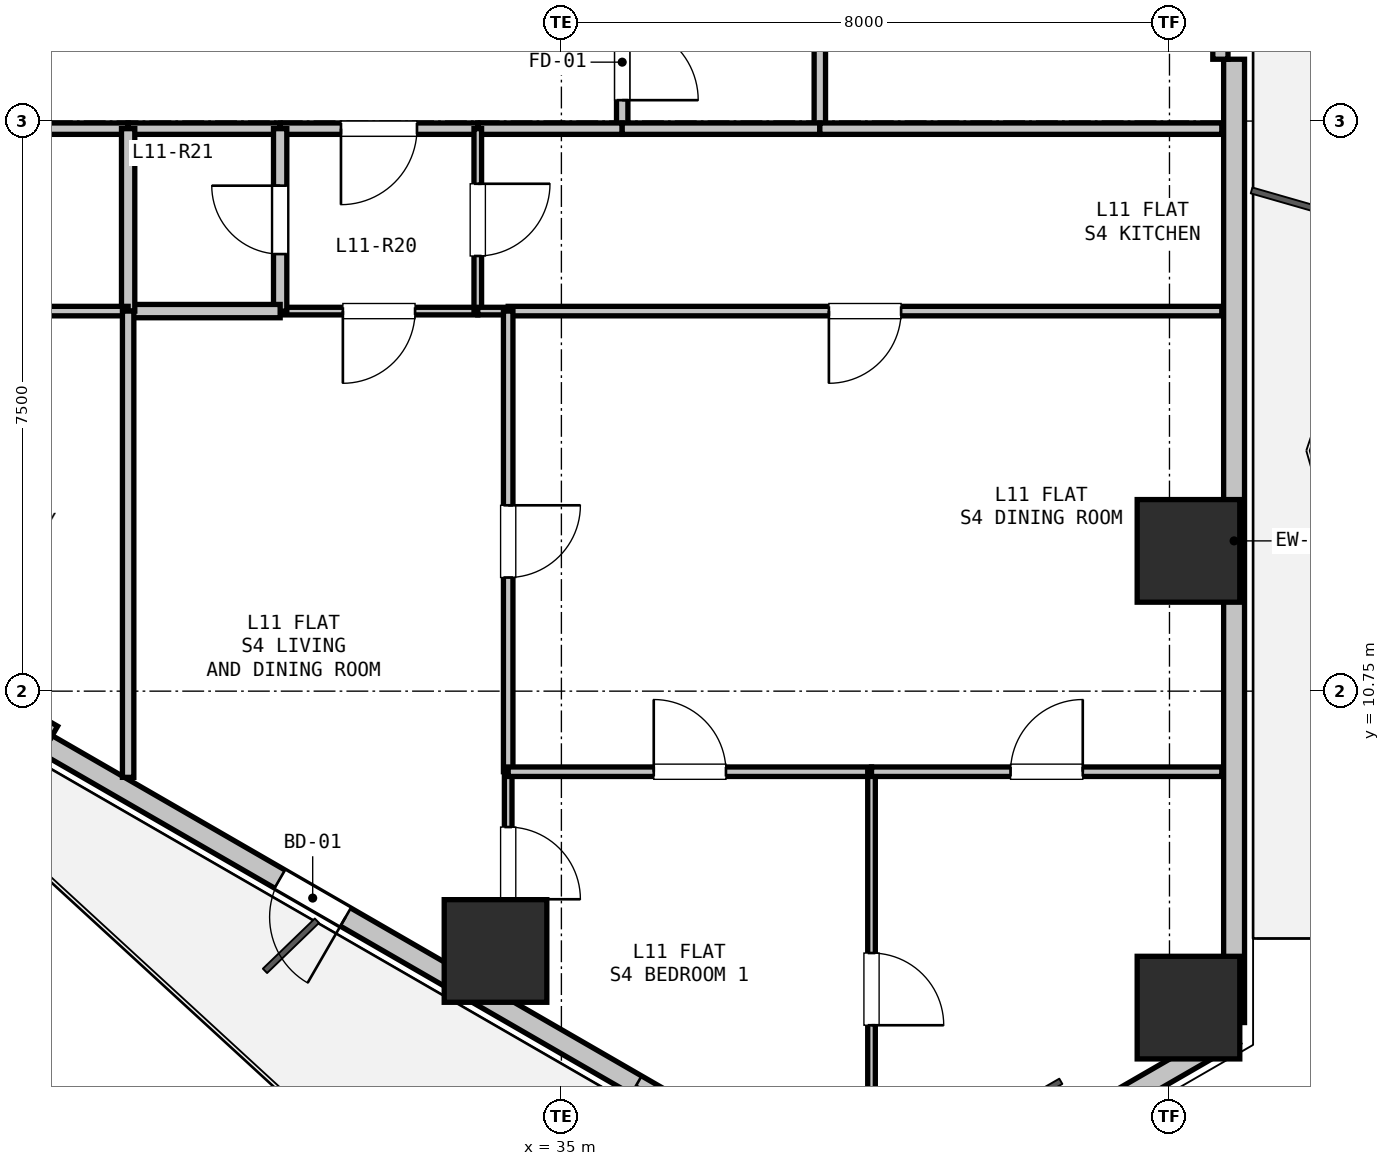
"""IFC4 building model, lengths in metres.
Left out: names, types, materials, properties, quantities, classifications, styles, units other than length and angle.
Written with IfcOpenShell. Run it as: python <this file> out.ifc"""

import sys

from ifc_helpers import new_model, si_unit, direction, frame, frame_2d, origin, origin_2d, place, context, subcontext, project, spatial, rectangle, hollow_rectangle, extrude, element, fill, save


model = new_model("IFC4")
c1 = context("Model", 3, precision=1e-05, world=origin(), true_north=direction((0.0, 1.0)))
c2 = subcontext(c1, "Body", "Model", "MODEL_VIEW")
j1 = project(units=[si_unit("LENGTHUNIT", "METRE"), si_unit("PLANEANGLEUNIT", "RADIAN")], contexts=[c1])
p1 = place(None, origin())
s1 = spatial("IfcSite", under=j1, at=p1, CompositionType="ELEMENT")
p2 = place(p1, origin())
s2 = spatial("IfcBuilding", under=s1, at=p2, CompositionType="ELEMENT")
p3 = place(p2, frame((0.0, 0.0, 42.3)))
s3 = spatial("IfcBuildingStorey", under=s2, at=p3, CompositionType="ELEMENT", Elevation=42.3)
for number, where, z_axis, x_axis in (
    (1, (43.25, 12.595, 0.0), (0.0, 0.0, 1.0), (1.0, 0.0, 0.0)),
    (2, (43.25, 6.587, 0.0), (0.0, 0.0, 1.0), (1.0, 0.0, 0.0)),
    (3, (34.133, 7.332, 0.0), (0.0, 0.0, 1.0), (1.0, 0.0, 0.0)),
):
    element("IfcColumn", number, at=place(p3, frame(where, z_axis=z_axis, x_axis=x_axis)), inside=s3, PredefinedType="COLUMN", context=c2, shape_type="SweptSolid", body=[
        extrude(hollow_rectangle(XDim=1.35, YDim=1.35, WallThickness=0.036, at=origin_2d()), origin(), (0.0, 0.0, 1.0), 3.3),
    ])
p4 = place(p3, frame((43.85, 6.24, 0.0), z_axis=(0.0, 0.0, 1.0), x_axis=(-0.866043601342, -0.499968479581, 0.0)))
e4 = element("IfcWall", 4, at=p4, inside=s3, PredefinedType="SOLIDWALL", context=c2, shape_type="SweptSolid", body=[
    extrude(rectangle(XDim=5.211, YDim=0.275, at=frame_2d((2.605, 0.0))), origin(), (0.0, 0.0, 1.0), 2.66),
])
p5 = place(p3, frame((43.85, 19.063, 0.0), z_axis=(0.0, 0.0, 1.0), x_axis=(0.0, -1.0, 0.0)))
e5 = element("IfcWall", 5, at=p5, inside=s3, PredefinedType="SOLIDWALL", context=c2, shape_type="SweptSolid", body=[
    extrude(rectangle(XDim=12.673, YDim=0.275, at=frame_2d((6.336, 0.0))), origin(), (0.0, 0.0, 1.0), 2.66),
])
p6 = place(p3, frame((43.67, 20.763, 0.0), z_axis=(0.0, 0.0, 1.0), x_axis=(0.0, -1.0, 0.0)))
e6 = element("IfcWall", 6, at=p6, inside=s3, PredefinedType="PARAPET", context=c2, shape_type="SweptSolid", body=[
    extrude(rectangle(XDim=1.7, YDim=0.2, at=frame_2d((0.85, 0.0))), origin(), (0.0, 0.0, 1.0), 2.66),
])
p7 = place(p3, frame((39.207, 3.71, 0.0), z_axis=(0.0, 0.0, 1.0), x_axis=(-0.86603192154, 0.499988710747, 0.0)))
e7 = element("IfcWall", 7, at=p7, inside=s3, PredefinedType="SOLIDWALL", context=c2, shape_type="SweptSolid", body=[
    extrude(rectangle(XDim=12.673, YDim=0.275, at=frame_2d((6.336, 0.0))), origin(), (0.0, 0.0, 1.0), 2.66),
])
p8 = place(p7, frame((8.136, 0.0, 0.0)))
e8 = element("IfcOpeningElement", 8, at=p8, cuts=e7, PredefinedType="OPENING", context=c2, shape_type="SweptSolid", body=[
    extrude(rectangle(XDim=1.0, YDim=2.1, at=frame_2d((0.5, 1.05))), frame((0.0, 0.147, 0.0), z_axis=(0.0, -1.0, 0.0), x_axis=(1.0, 0.0, 0.0)), (0.0, 0.0, 1.0), 0.295),
])
p9 = place(p7, frame((2.518, 0.0, 0.9)))
e9 = element("IfcOpeningElement", 9, at=p9, cuts=e7, PredefinedType="OPENING", context=c2, shape_type="SweptSolid", body=[
    extrude(rectangle(XDim=1.2, YDim=1.4, at=frame_2d((0.6, 0.7))), frame((0.0, 0.147, 0.0), z_axis=(0.0, -1.0, 0.0), x_axis=(1.0, 0.0, 0.0)), (0.0, 0.0, 1.0), 0.295),
])
p10 = place(p3, frame((28.322, 10.202, 0.0), z_axis=(0.0, 0.0, 1.0), x_axis=(-0.86605165483, 0.499954529098, 0.0)))
e10 = element("IfcWall", 10, at=p10, inside=s3, PredefinedType="PARAPET", context=c2, shape_type="SweptSolid", body=[
    extrude(rectangle(XDim=1.7, YDim=0.2, at=frame_2d((0.85, 0.0))), origin(), (0.0, 0.0, 1.0), 2.66),
])
p11 = place(p3, frame((35.8, 19.9, 0.0), z_axis=(0.0, 0.0, 1.0), x_axis=(0.0, -1.0, 0.0)))
e11 = element("IfcWall", 11, at=p11, inside=s3, PredefinedType="PARTITIONING", context=c2, shape_type="SweptSolid", body=[
    extrude(rectangle(XDim=1.75, YDim=0.15, at=frame_2d((0.875, 0.0))), origin(), (0.0, 0.0, 1.0), 3.04),
])
p12 = place(p11, frame((0.375, 0.0, 0.0)))
e12 = element("IfcOpeningElement", 12, at=p12, cuts=e11, PredefinedType="OPENING", context=c2, shape_type="SweptSolid", body=[
    extrude(rectangle(XDim=1.0, YDim=2.15, at=frame_2d((0.5, 1.075))), frame((0.0, 0.085, 0.0), z_axis=(0.0, -1.0, 0.0), x_axis=(1.0, 0.0, 0.0)), (0.0, 0.0, 1.0), 0.17),
])
p13 = place(p3, frame((35.8, 18.15, 0.0), z_axis=(0.0, 0.0, 1.0), x_axis=(-1.0, 0.0, 0.0)))
e13 = element("IfcWall", 13, at=p13, inside=s3, PredefinedType="PARTITIONING", context=c2, shape_type="SweptSolid", body=[
    extrude(rectangle(XDim=1.9, YDim=0.15, at=frame_2d((0.95, 0.0))), origin(), (0.0, 0.0, 1.0), 3.04),
])
p14 = place(p3, frame((33.9, 18.15, 0.0), z_axis=(0.0, 0.0, 1.0), x_axis=(-1.0, 0.0, 0.0)))
e14 = element("IfcWall", 14, at=p14, inside=s3, PredefinedType="PARTITIONING", context=c2, shape_type="SweptSolid", body=[
    extrude(rectangle(XDim=2.6, YDim=0.15, at=frame_2d((1.3, 0.0))), origin(), (0.0, 0.0, 1.0), 3.04),
])
p15 = place(p14, frame((0.8, 0.0, 0.0)))
e15 = element("IfcOpeningElement", 15, at=p15, cuts=e14, PredefinedType="OPENING", context=c2, shape_type="SweptSolid", body=[
    extrude(rectangle(XDim=1.0, YDim=2.15, at=frame_2d((0.5, 1.075))), frame((0.0, 0.085, 0.0), z_axis=(0.0, -1.0, 0.0), x_axis=(1.0, 0.0, 0.0)), (0.0, 0.0, 1.0), 0.17),
])
p16 = place(p3, frame((31.3, 18.15, 0.0), z_axis=(0.0, 0.0, 1.0), x_axis=(-1.0, 0.0, 0.0)))
e16 = element("IfcWall", 16, at=p16, inside=s3, PredefinedType="PARTITIONING", context=c2, shape_type="SweptSolid", body=[
    extrude(rectangle(XDim=2.0, YDim=0.15, at=frame_2d((1.0, 0.0))), origin(), (0.0, 0.0, 1.0), 3.04),
])
p17 = place(p3, frame((29.3, 18.15, 0.0), z_axis=(0.0, 0.0, 1.0), x_axis=(-1.0, 0.0, 0.0)))
e17 = element("IfcWall", 17, at=p17, inside=s3, PredefinedType="PARTITIONING", context=c2, shape_type="SweptSolid", body=[
    extrude(rectangle(XDim=2.2, YDim=0.15, at=frame_2d((1.1, 0.0))), origin(), (0.0, 0.0, 1.0), 3.04),
])
p18 = place(p3, frame((38.4, 22.8, 0.0), z_axis=(0.0, 0.0, 1.0), x_axis=(0.0, -1.0, 0.0)))
e18 = element("IfcWall", 18, at=p18, inside=s3, PredefinedType="PARTITIONING", context=c2, shape_type="SweptSolid", body=[
    extrude(rectangle(XDim=4.65, YDim=0.15, at=frame_2d((2.325, 0.0))), origin(), (0.0, 0.0, 1.0), 3.04),
])
p19 = place(p18, frame((1.9, 0.0, 0.0)))
e19 = element("IfcOpeningElement", 19, at=p19, cuts=e18, PredefinedType="OPENING", context=c2, shape_type="SweptSolid", body=[
    extrude(rectangle(XDim=0.85, YDim=2.1, at=frame_2d((0.425, 1.05))), frame((0.0, 0.085, 0.0), z_axis=(0.0, -1.0, 0.0), x_axis=(1.0, 0.0, 0.0)), (0.0, 0.0, 1.0), 0.17),
])
p20 = place(p3, frame((38.4, 18.15, 0.0), z_axis=(0.0, 0.0, 1.0), x_axis=(-1.0, 0.0, 0.0)))
e20 = element("IfcWall", 20, at=p20, inside=s3, PredefinedType="PARTITIONING", context=c2, shape_type="SweptSolid", body=[
    extrude(rectangle(XDim=2.6, YDim=0.15, at=frame_2d((1.3, 0.0))), origin(), (0.0, 0.0, 1.0), 2.337),
])
p21 = place(p3, frame((33.9, 15.75, 0.0), z_axis=(0.0, 0.0, 1.0), x_axis=(-1.0, 0.0, 0.0)))
e21 = element("IfcWall", 21, at=p21, inside=s3, PredefinedType="PARTITIONING", context=c2, shape_type="SweptSolid", body=[
    extrude(rectangle(XDim=2.6, YDim=0.1, at=frame_2d((1.3, 0.0))), origin(), (0.0, 0.0, 1.0), 3.04),
])
p22 = place(p21, frame((0.825, 0.0, 0.0)))
e22 = element("IfcOpeningElement", 22, at=p22, cuts=e21, PredefinedType="OPENING", context=c2, shape_type="SweptSolid", body=[
    extrude(rectangle(XDim=0.95, YDim=2.1, at=frame_2d((0.475, 1.05))), frame((0.0, 0.06, 0.0), z_axis=(0.0, -1.0, 0.0), x_axis=(1.0, 0.0, 0.0)), (0.0, 0.0, 1.0), 0.12),
])
p23 = place(p3, frame((31.3, 15.75, 0.0), z_axis=(0.0, 0.0, 1.0), x_axis=(0.0, 1.0, 0.0)))
e23 = element("IfcWall", 23, at=p23, inside=s3, PredefinedType="PLUMBINGWALL", context=c2, shape_type="SweptSolid", body=[
    extrude(rectangle(XDim=2.4, YDim=0.175, at=frame_2d((1.2, 0.0))), origin(), (0.0, 0.0, 1.0), 3.04),
])
p24 = place(p23, frame((0.75, 0.0, 0.0)))
e24 = element("IfcOpeningElement", 24, at=p24, cuts=e23, PredefinedType="OPENING", context=c2, shape_type="SweptSolid", body=[
    extrude(rectangle(XDim=0.9, YDim=2.1, at=frame_2d((0.45, 1.05))), frame((0.0, 0.097, 0.0), z_axis=(0.0, -1.0, 0.0), x_axis=(1.0, 0.0, 0.0)), (0.0, 0.0, 1.0), 0.195),
])
p25 = place(p3, frame((33.9, 18.15, 0.0), z_axis=(0.0, 0.0, 1.0), x_axis=(0.0, -1.0, 0.0)))
e25 = element("IfcWall", 25, at=p25, inside=s3, PredefinedType="PARTITIONING", context=c2, shape_type="SweptSolid", body=[
    extrude(rectangle(XDim=2.4, YDim=0.1, at=frame_2d((1.2, 0.0))), origin(), (0.0, 0.0, 1.0), 3.04),
])
p26 = place(p25, frame((0.725, 0.0, 0.0)))
e26 = element("IfcOpeningElement", 26, at=p26, cuts=e25, PredefinedType="OPENING", context=c2, shape_type="SweptSolid", body=[
    extrude(rectangle(XDim=0.95, YDim=2.1, at=frame_2d((0.475, 1.05))), frame((0.0, 0.06, 0.0), z_axis=(0.0, -1.0, 0.0), x_axis=(1.0, 0.0, 0.0)), (0.0, 0.0, 1.0), 0.12),
])
p27 = place(p3, frame((31.3, 15.75, 0.0), z_axis=(0.0, 0.0, 1.0), x_axis=(-1.0, 0.0, 0.0)))
e27 = element("IfcWall", 27, at=p27, inside=s3, PredefinedType="PLUMBINGWALL", context=c2, shape_type="SweptSolid", body=[
    extrude(rectangle(XDim=2.0, YDim=0.175, at=frame_2d((1.0, 0.0))), origin(), (0.0, 0.0, 1.0), 3.04),
])
p28 = place(p3, frame((29.3, 15.75, 0.0), z_axis=(0.0, 0.0, 1.0), x_axis=(0.0, 1.0, 0.0)))
e28 = element("IfcWall", 28, at=p28, inside=s3, PredefinedType="PLUMBINGWALL", context=c2, shape_type="SweptSolid", body=[
    extrude(rectangle(XDim=2.4, YDim=0.175, at=frame_2d((1.2, 0.0))), origin(), (0.0, 0.0, 1.0), 3.04),
])
p29 = place(p3, frame((38.4, 18.15, 0.0), z_axis=(0.0, 0.0, 1.0), x_axis=(1.0, 0.0, 0.0)))
e29 = element("IfcWall", 29, at=p29, inside=s3, PredefinedType="PARTITIONING", context=c2, shape_type="SweptSolid", body=[
    extrude(rectangle(XDim=5.289, YDim=0.15, at=frame_2d((2.644, 0.0))), origin(), (0.0, 0.0, 1.0), 2.365),
])
p30 = place(p3, frame((43.688, 15.75, 0.0), z_axis=(0.0, 0.0, 1.0), x_axis=(-1.0, 0.0, 0.0)))
e30 = element("IfcWall", 30, at=p30, inside=s3, PredefinedType="PARTITIONING", context=c2, shape_type="SweptSolid", body=[
    extrude(rectangle(XDim=9.388, YDim=0.125, at=frame_2d((4.694, 0.0))), origin(), (0.0, 0.0, 1.0), 2.337),
])
p31 = place(p30, frame((4.219, 0.0, 0.0)))
e31 = element("IfcOpeningElement", 31, at=p31, cuts=e30, PredefinedType="OPENING", context=c2, shape_type="SweptSolid", body=[
    extrude(rectangle(XDim=0.95, YDim=2.1, at=frame_2d((0.475, 1.05))), frame((0.0, 0.073, 0.0), z_axis=(0.0, -1.0, 0.0), x_axis=(1.0, 0.0, 0.0)), (0.0, 0.0, 1.0), 0.145),
])
p32 = place(p3, frame((34.3, 15.75, 0.0), z_axis=(0.0, 0.0, 1.0), x_axis=(-1.0, 0.0, 0.0)))
e32 = element("IfcWall", 32, at=p32, inside=s3, PredefinedType="PARTITIONING", context=c2, shape_type="SweptSolid", body=[
    extrude(rectangle(XDim=0.4, YDim=0.1, at=frame_2d((0.2, 0.0))), origin(), (0.0, 0.0, 1.0), 3.04),
])
p33 = place(p3, frame((27.1, 15.75, 0.0), z_axis=(0.0, 0.0, 1.0), x_axis=(1.0, 0.0, 0.0)))
e33 = element("IfcWall", 33, at=p33, inside=s3, PredefinedType="PARTITIONING", context=c2, shape_type="SweptSolid", body=[
    extrude(rectangle(XDim=2.2, YDim=0.125, at=frame_2d((1.1, 0.0))), origin(), (0.0, 0.0, 1.0), 3.04),
])
p34 = place(p3, frame((29.3, 15.75, 0.0), z_axis=(0.0, 0.0, 1.0), x_axis=(0.0, -1.0, 0.0)))
e34 = element("IfcWall", 34, at=p34, inside=s3, PredefinedType="PARTITIONING", context=c2, shape_type="SweptSolid", body=[
    extrude(rectangle(XDim=6.134, YDim=0.15, at=frame_2d((3.067, 0.0))), origin(), (0.0, 0.0, 1.0), 2.337),
])
p35 = place(p3, frame((34.3, 15.75, 0.0), z_axis=(0.0, 0.0, 1.0), x_axis=(0.0, -1.0, 0.0)))
e35 = element("IfcWall", 35, at=p35, inside=s3, PredefinedType="PARTITIONING", context=c2, shape_type="SweptSolid", body=[
    extrude(rectangle(XDim=6.06, YDim=0.125, at=frame_2d((3.03, 0.0))), origin(), (0.0, 0.0, 1.0), 3.04),
])
p36 = place(p35, frame((2.555, 0.0, 0.0)))
e36 = element("IfcOpeningElement", 36, at=p36, cuts=e35, PredefinedType="OPENING", context=c2, shape_type="SweptSolid", body=[
    extrude(rectangle(XDim=0.95, YDim=2.1, at=frame_2d((0.475, 1.05))), frame((0.0, 0.073, 0.0), z_axis=(0.0, -1.0, 0.0), x_axis=(1.0, 0.0, 0.0)), (0.0, 0.0, 1.0), 0.145),
])
p37 = place(p3, frame((34.3, 9.69, 0.0), z_axis=(0.0, 0.0, 1.0), x_axis=(0.0, -1.0, 0.0)))
e37 = element("IfcWall", 37, at=p37, inside=s3, PredefinedType="PARTITIONING", context=c2, shape_type="SweptSolid", body=[
    extrude(rectangle(XDim=2.961, YDim=0.1, at=frame_2d((1.48, 0.0))), origin(), (0.0, 0.0, 1.0), 3.04),
])
p38 = place(p37, frame((0.728, 0.0, 0.0)))
e38 = element("IfcOpeningElement", 38, at=p38, cuts=e37, PredefinedType="OPENING", context=c2, shape_type="SweptSolid", body=[
    extrude(rectangle(XDim=0.95, YDim=2.1, at=frame_2d((0.475, 1.05))), frame((0.0, 0.06, 0.0), z_axis=(0.0, -1.0, 0.0), x_axis=(1.0, 0.0, 0.0)), (0.0, 0.0, 1.0), 0.12),
])
p39 = place(p3, frame((34.3, 9.69, 0.0), z_axis=(0.0, 0.0, 1.0), x_axis=(1.0, 0.0, 0.0)))
e39 = element("IfcWall", 39, at=p39, inside=s3, PredefinedType="PARTITIONING", context=c2, shape_type="SweptSolid", body=[
    extrude(rectangle(XDim=4.78, YDim=0.125, at=frame_2d((2.39, 0.0))), origin(), (0.0, 0.0, 1.0), 3.04),
])
p40 = place(p39, frame((1.915, 0.0, 0.0)))
e40 = element("IfcOpeningElement", 40, at=p40, cuts=e39, PredefinedType="OPENING", context=c2, shape_type="SweptSolid", body=[
    extrude(rectangle(XDim=0.95, YDim=2.1, at=frame_2d((0.475, 1.05))), frame((0.0, 0.073, 0.0), z_axis=(0.0, -1.0, 0.0), x_axis=(1.0, 0.0, 0.0)), (0.0, 0.0, 1.0), 0.145),
])
p41 = place(p3, frame((39.08, 9.69, 0.0), z_axis=(0.0, 0.0, 1.0), x_axis=(0.0, -1.0, 0.0)))
e41 = element("IfcWall", 41, at=p41, inside=s3, PredefinedType="PARTITIONING", context=c2, shape_type="SweptSolid", body=[
    extrude(rectangle(XDim=5.72, YDim=0.1, at=frame_2d((2.86, 0.0))), origin(), (0.0, 0.0, 1.0), 3.04),
])
p42 = place(p41, frame((2.385, 0.0, 0.0)))
e42 = element("IfcOpeningElement", 42, at=p42, cuts=e41, PredefinedType="OPENING", context=c2, shape_type="SweptSolid", body=[
    extrude(rectangle(XDim=0.95, YDim=2.1, at=frame_2d((0.475, 1.05))), frame((0.0, 0.06, 0.0), z_axis=(0.0, -1.0, 0.0), x_axis=(1.0, 0.0, 0.0)), (0.0, 0.0, 1.0), 0.12),
])
p43 = place(p3, frame((39.08, 9.69, 0.0), z_axis=(0.0, 0.0, 1.0), x_axis=(1.0, 0.0, 0.0)))
e43 = element("IfcWall", 43, at=p43, inside=s3, PredefinedType="PARTITIONING", context=c2, shape_type="SweptSolid", body=[
    extrude(rectangle(XDim=4.608, YDim=0.125, at=frame_2d((2.304, 0.0))), origin(), (0.0, 0.0, 1.0), 2.337),
])
p44 = place(p43, frame((1.829, 0.0, 0.0)))
e44 = element("IfcOpeningElement", 44, at=p44, cuts=e43, PredefinedType="OPENING", context=c2, shape_type="SweptSolid", body=[
    extrude(rectangle(XDim=0.95, YDim=2.1, at=frame_2d((0.475, 1.05))), frame((0.0, 0.073, 0.0), z_axis=(0.0, -1.0, 0.0), x_axis=(1.0, 0.0, 0.0)), (0.0, 0.0, 1.0), 0.145),
])
p45 = place(p8, origin())
e45 = element("IfcDoor", 45, at=p45, inside=s3, OperationType="SINGLE_SWING_LEFT", PredefinedType="DOOR", context=c2, shape_type="SweptSolid", body=[
    extrude(rectangle(XDim=1.0, YDim=2.1, at=frame_2d((0.5, 1.05))), frame((0.0, 0.025, 0.0), z_axis=(0.0, -1.0, 0.0), x_axis=(1.0, 0.0, 0.0)), (0.0, 0.0, 1.0), 0.05),
])
fill(e8, e45)
p46 = place(p9, origin())
e46 = element("IfcWindow", 46, at=p46, inside=s3, PartitioningType="SINGLE_PANEL", PredefinedType="WINDOW", context=c2, shape_type="SweptSolid", body=[
    extrude(rectangle(XDim=1.2, YDim=1.4, at=frame_2d((0.6, 0.7))), frame((0.0, 0.03, 0.0), z_axis=(0.0, -1.0, 0.0), x_axis=(1.0, 0.0, 0.0)), (0.0, 0.0, 1.0), 0.06),
])
fill(e9, e46)
p47 = place(p12, origin())
e47 = element("IfcDoor", 47, at=p47, inside=s3, OperationType="SINGLE_SWING_RIGHT", PredefinedType="DOOR", context=c2, shape_type="SweptSolid", body=[
    extrude(rectangle(XDim=1.0, YDim=2.15, at=frame_2d((0.5, 1.075))), frame((0.0, 0.025, 0.0), z_axis=(0.0, -1.0, 0.0), x_axis=(1.0, 0.0, 0.0)), (0.0, 0.0, 1.0), 0.05),
])
fill(e12, e47)
p48 = place(p15, origin())
e48 = element("IfcDoor", 48, at=p48, inside=s3, OperationType="SINGLE_SWING_RIGHT", PredefinedType="DOOR", context=c2, shape_type="SweptSolid", body=[
    extrude(rectangle(XDim=1.0, YDim=2.15, at=frame_2d((0.5, 1.075))), frame((0.0, 0.025, 0.0), z_axis=(0.0, -1.0, 0.0), x_axis=(1.0, 0.0, 0.0)), (0.0, 0.0, 1.0), 0.05),
])
fill(e15, e48)
p49 = place(p24, origin())
e49 = element("IfcDoor", 49, at=p49, inside=s3, OperationType="SINGLE_SWING_RIGHT", PredefinedType="DOOR", context=c2, shape_type="SweptSolid", body=[
    extrude(rectangle(XDim=0.9, YDim=2.1, at=frame_2d((0.45, 1.05))), frame((0.0, 0.025, 0.0), z_axis=(0.0, -1.0, 0.0), x_axis=(1.0, 0.0, 0.0)), (0.0, 0.0, 1.0), 0.05),
])
fill(e24, e49)
p50 = place(p26, origin())
e50 = element("IfcDoor", 50, at=p50, inside=s3, OperationType="SINGLE_SWING_LEFT", PredefinedType="DOOR", context=c2, shape_type="SweptSolid", body=[
    extrude(rectangle(XDim=0.95, YDim=2.1, at=frame_2d((0.475, 1.05))), frame((0.0, 0.025, 0.0), z_axis=(0.0, -1.0, 0.0), x_axis=(1.0, 0.0, 0.0)), (0.0, 0.0, 1.0), 0.05),
])
fill(e26, e50)
p51 = place(p22, origin())
e51 = element("IfcDoor", 51, at=p51, inside=s3, OperationType="SINGLE_SWING_RIGHT", PredefinedType="DOOR", context=c2, shape_type="SweptSolid", body=[
    extrude(rectangle(XDim=0.95, YDim=2.1, at=frame_2d((0.475, 1.05))), frame((0.0, 0.025, 0.0), z_axis=(0.0, -1.0, 0.0), x_axis=(1.0, 0.0, 0.0)), (0.0, 0.0, 1.0), 0.05),
])
fill(e22, e51)
p52 = place(p31, origin())
e52 = element("IfcDoor", 52, at=p52, inside=s3, OperationType="SINGLE_SWING_RIGHT", PredefinedType="DOOR", context=c2, shape_type="SweptSolid", body=[
    extrude(rectangle(XDim=0.95, YDim=2.1, at=frame_2d((0.475, 1.05))), frame((0.0, 0.025, 0.0), z_axis=(0.0, -1.0, 0.0), x_axis=(1.0, 0.0, 0.0)), (0.0, 0.0, 1.0), 0.05),
])
fill(e31, e52)
p53 = place(p38, origin())
e53 = element("IfcDoor", 53, at=p53, inside=s3, OperationType="SINGLE_SWING_RIGHT", PredefinedType="DOOR", context=c2, shape_type="SweptSolid", body=[
    extrude(rectangle(XDim=0.95, YDim=2.1, at=frame_2d((0.475, 1.05))), frame((0.0, 0.025, 0.0), z_axis=(0.0, -1.0, 0.0), x_axis=(1.0, 0.0, 0.0)), (0.0, 0.0, 1.0), 0.05),
])
fill(e38, e53)
p54 = place(p36, origin())
e54 = element("IfcDoor", 54, at=p54, inside=s3, OperationType="SINGLE_SWING_LEFT", PredefinedType="DOOR", context=c2, shape_type="SweptSolid", body=[
    extrude(rectangle(XDim=0.95, YDim=2.1, at=frame_2d((0.475, 1.05))), frame((0.0, 0.025, 0.0), z_axis=(0.0, -1.0, 0.0), x_axis=(1.0, 0.0, 0.0)), (0.0, 0.0, 1.0), 0.05),
])
fill(e36, e54)
p55 = place(p42, origin())
e55 = element("IfcDoor", 55, at=p55, inside=s3, OperationType="SINGLE_SWING_RIGHT", PredefinedType="DOOR", context=c2, shape_type="SweptSolid", body=[
    extrude(rectangle(XDim=0.95, YDim=2.1, at=frame_2d((0.475, 1.05))), frame((0.0, 0.025, 0.0), z_axis=(0.0, -1.0, 0.0), x_axis=(1.0, 0.0, 0.0)), (0.0, 0.0, 1.0), 0.05),
])
fill(e42, e55)
p56 = place(p40, origin())
e56 = element("IfcDoor", 56, at=p56, inside=s3, OperationType="SINGLE_SWING_LEFT", PredefinedType="DOOR", context=c2, shape_type="SweptSolid", body=[
    extrude(rectangle(XDim=0.95, YDim=2.1, at=frame_2d((0.475, 1.05))), frame((0.0, 0.025, 0.0), z_axis=(0.0, -1.0, 0.0), x_axis=(1.0, 0.0, 0.0)), (0.0, 0.0, 1.0), 0.05),
])
fill(e40, e56)
p57 = place(p44, origin())
e57 = element("IfcDoor", 57, at=p57, inside=s3, OperationType="SINGLE_SWING_RIGHT", PredefinedType="DOOR", context=c2, shape_type="SweptSolid", body=[
    extrude(rectangle(XDim=0.95, YDim=2.1, at=frame_2d((0.475, 1.05))), frame((0.0, 0.025, 0.0), z_axis=(0.0, -1.0, 0.0), x_axis=(1.0, 0.0, 0.0)), (0.0, 0.0, 1.0), 0.05),
])
fill(e44, e57)
save(model, sys.argv[1])
